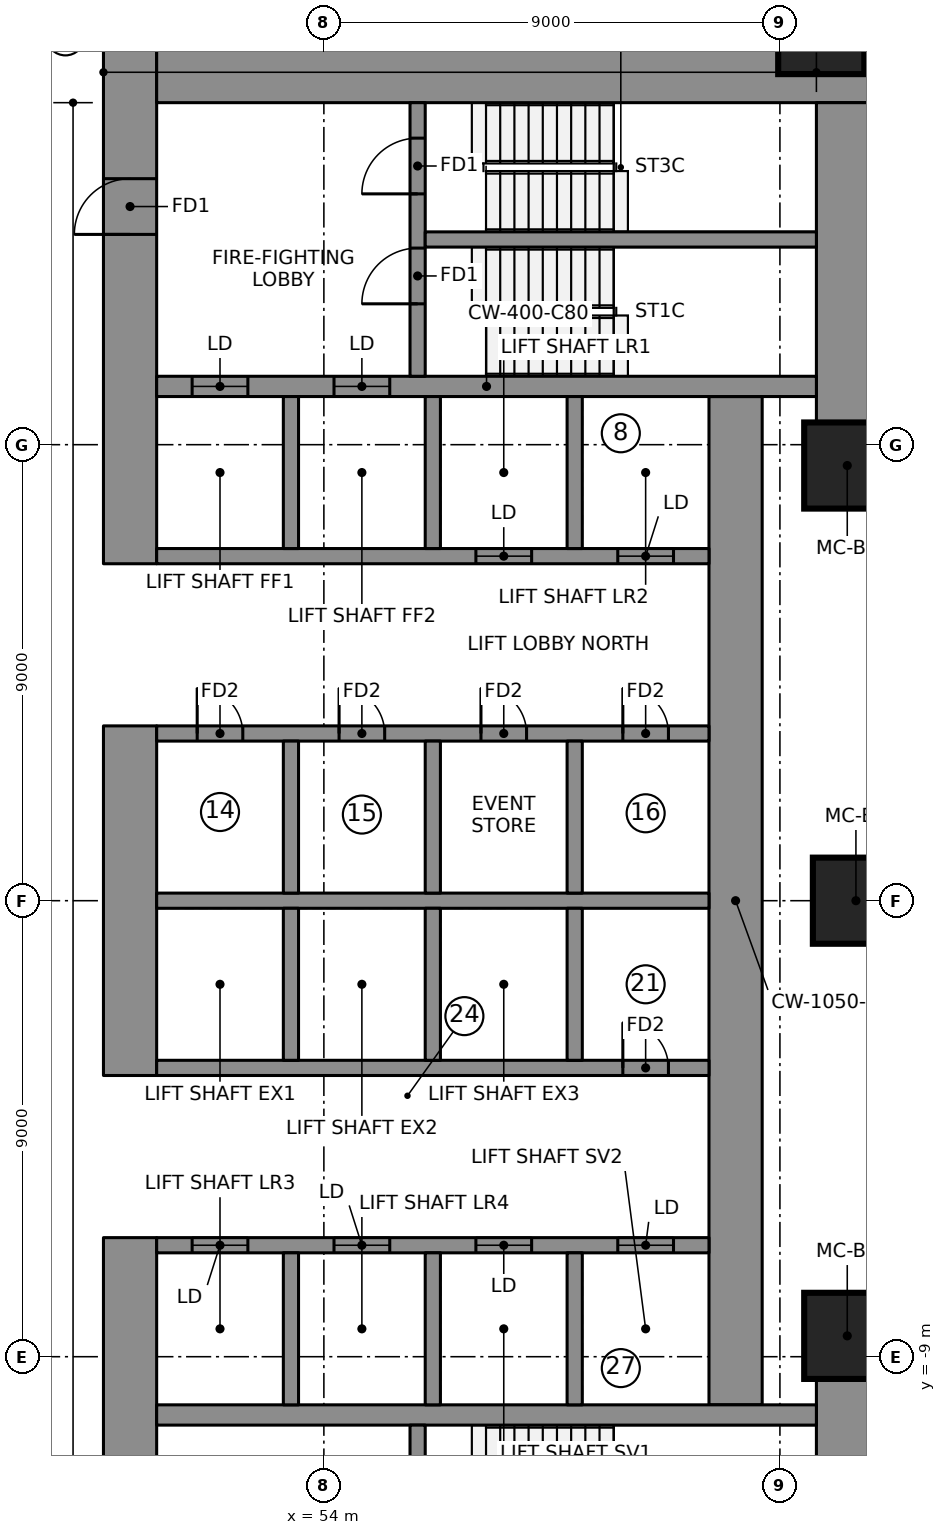
"""IFC4 building model, lengths in metres.
Left out: names, types, materials, properties, quantities, classifications, styles, units other than length and angle.
Written with IfcOpenShell. Run it as: python <this file> out.ifc"""

import sys

from ifc_helpers import new_model, si_unit, direction, frame, frame_2d, origin, origin_2d, place, context, subcontext, project, spatial, rectangle, extrude, element, fill, save


model = new_model("IFC4")
c1 = context("Model", 3, precision=1e-05, world=origin(), true_north=direction((0.0, 1.0)))
c2 = subcontext(c1, "Body", "Model", "MODEL_VIEW")
j1 = project(units=[si_unit("LENGTHUNIT", "METRE"), si_unit("PLANEANGLEUNIT", "RADIAN")], contexts=[c1])
p1 = place(None, origin())
s1 = spatial("IfcSite", under=j1, at=p1, CompositionType="ELEMENT")
p2 = place(p1, origin())
s2 = spatial("IfcBuilding", under=s1, at=p2, CompositionType="ELEMENT")
p3 = place(p2, frame((0.0, 0.0, 113.3)))
s3 = spatial("IfcBuildingStorey", under=s2, at=p3, CompositionType="ELEMENT", Elevation=113.3)
p4 = place(p3, frame((50.175, 6.65, 0.0), z_axis=(0.0, 0.0, 1.0), x_axis=(0.0, 1.0, 0.0)))
e1 = element("IfcWall", 1, at=p4, inside=s3, PredefinedType="SHEAR", context=c2, shape_type="SweptSolid", body=[
    extrude(rectangle(XDim=10.15, YDim=1.05, at=frame_2d((5.075, 0.0))), origin(), (0.0, 0.0, 1.0), 3.55),
])
p5 = place(p4, frame((6.5, 0.0, 0.0)))
e2 = element("IfcOpeningElement", 2, at=p5, cuts=e1, PredefinedType="OPENING", context=c2, shape_type="SweptSolid", body=[
    extrude(rectangle(XDim=1.1, YDim=2.1, at=frame_2d((0.55, 1.05))), frame((0.0, 0.535, 0.0), z_axis=(0.0, -1.0, 0.0), x_axis=(1.0, 0.0, 0.0)), (0.0, 0.0, 1.0), 1.07),
])
p6 = place(p3, frame((50.175, -3.45, 0.0), z_axis=(0.0, 0.0, 1.0), x_axis=(0.0, 1.0, 0.0)))
e3 = element("IfcWall", 3, at=p6, inside=s3, PredefinedType="SHEAR", context=c2, shape_type="SweptSolid", body=[
    extrude(rectangle(XDim=6.9, YDim=1.05, at=frame_2d((3.45, 0.0))), origin(), (0.0, 0.0, 1.0), 3.55),
])
p7 = place(p3, frame((50.175, -16.8, 0.0), z_axis=(0.0, 0.0, 1.0), x_axis=(0.0, 1.0, 0.0)))
e4 = element("IfcWall", 4, at=p7, inside=s3, PredefinedType="SHEAR", context=c2, shape_type="SweptSolid", body=[
    extrude(rectangle(XDim=10.15, YDim=1.05, at=frame_2d((5.075, 0.0))), origin(), (0.0, 0.0, 1.0), 3.55),
])
p8 = place(p7, frame((2.55, 0.0, 0.0)))
e5 = element("IfcOpeningElement", 5, at=p8, cuts=e4, PredefinedType="OPENING", context=c2, shape_type="SweptSolid", body=[
    extrude(rectangle(XDim=1.1, YDim=2.1, at=frame_2d((0.55, 1.05))), frame((0.0, 0.535, 0.0), z_axis=(0.0, -1.0, 0.0), x_axis=(1.0, 0.0, 0.0)), (0.0, 0.0, 1.0), 1.07),
])
p9 = place(p3, frame((50.7, 16.275, 0.0), z_axis=(0.0, 0.0, 1.0), x_axis=(1.0, 0.0, 0.0)))
e6 = element("IfcWall", 6, at=p9, inside=s3, PredefinedType="SHEAR", context=c2, shape_type="SweptSolid", body=[
    extrude(rectangle(XDim=14.07, YDim=1.05, at=frame_2d((7.035, 0.0))), origin(), (0.0, 0.0, 1.0), 3.55),
])
for number, where, z_axis, x_axis in (
    (7, (64.245, 9.389, 0.0), (0.0, 0.0, 1.0), (0.0, 1.0, 0.0)),
    (8, (64.245, -15.75, 0.0), (0.0, 0.0, 1.0), (0.0, 1.0, 0.0)),
):
    element("IfcWall", number, at=place(p3, frame(where, z_axis=z_axis, x_axis=x_axis)), inside=s3, PredefinedType="SHEAR", context=c2, shape_type="SweptSolid", body=[
        extrude(rectangle(XDim=6.361, YDim=1.05, at=frame_2d((3.181, 0.0))), origin(), (0.0, 0.0, 1.0), 3.55),
    ])
p10 = place(p3, frame((62.125, -9.95, 0.0), z_axis=(0.0, 0.0, 1.0), x_axis=(0.0, 1.0, 0.0)))
e9 = element("IfcWall", 9, at=p10, inside=s3, PredefinedType="SHEAR", context=c2, shape_type="SweptSolid", body=[
    extrude(rectangle(XDim=19.9, YDim=1.05, at=frame_2d((9.95, 0.0))), origin(), (0.0, 0.0, 1.0), 3.55),
])
p11 = place(p3, frame((50.7, 10.15, 0.0), z_axis=(0.0, 0.0, 1.0), x_axis=(1.0, 0.0, 0.0)))
e10 = element("IfcWall", 10, at=p11, inside=s3, PredefinedType="SHEAR", context=c2, shape_type="SweptSolid", body=[
    extrude(rectangle(XDim=13.02, YDim=0.4, at=frame_2d((6.51, 0.0))), origin(), (0.0, 0.0, 1.0), 3.55),
])
p12 = place(p11, frame((0.7, 0.0, 0.0)))
e11 = element("IfcOpeningElement", 11, at=p12, cuts=e10, PredefinedType="OPENING", context=c2, shape_type="SweptSolid", body=[
    extrude(rectangle(XDim=1.1, YDim=2.1, at=frame_2d((0.55, 1.05))), frame((0.0, 0.21, 0.0), z_axis=(0.0, -1.0, 0.0), x_axis=(1.0, 0.0, 0.0)), (0.0, 0.0, 1.0), 0.42),
])
p13 = place(p11, frame((3.5, 0.0, 0.0)))
e12 = element("IfcOpeningElement", 12, at=p13, cuts=e10, PredefinedType="OPENING", context=c2, shape_type="SweptSolid", body=[
    extrude(rectangle(XDim=1.1, YDim=2.1, at=frame_2d((0.55, 1.05))), frame((0.0, 0.21, 0.0), z_axis=(0.0, -1.0, 0.0), x_axis=(1.0, 0.0, 0.0)), (0.0, 0.0, 1.0), 0.42),
])
p14 = place(p3, frame((50.7, -10.15, 0.0), z_axis=(0.0, 0.0, 1.0), x_axis=(1.0, 0.0, 0.0)))
e13 = element("IfcWall", 13, at=p14, inside=s3, PredefinedType="SHEAR", context=c2, shape_type="SweptSolid", body=[
    extrude(rectangle(XDim=13.02, YDim=0.4, at=frame_2d((6.51, 0.0))), origin(), (0.0, 0.0, 1.0), 3.55),
])
p15 = place(p3, frame((50.7, 0.0, 0.0), z_axis=(0.0, 0.0, 1.0), x_axis=(1.0, 0.0, 0.0)))
e14 = element("IfcWall", 14, at=p15, inside=s3, PredefinedType="SHEAR", context=c2, shape_type="SweptSolid", body=[
    extrude(rectangle(XDim=10.9, YDim=0.3, at=frame_2d((5.45, 0.0))), origin(), (0.0, 0.0, 1.0), 3.55),
])
p16 = place(p3, frame((50.7, 3.3, 0.0), z_axis=(0.0, 0.0, 1.0), x_axis=(1.0, 0.0, 0.0)))
e15 = element("IfcWall", 15, at=p16, inside=s3, PredefinedType="SHEAR", context=c2, shape_type="SweptSolid", body=[
    extrude(rectangle(XDim=10.9, YDim=0.3, at=frame_2d((5.45, 0.0))), origin(), (0.0, 0.0, 1.0), 3.55),
])
p17 = place(p16, frame((0.8, 0.0, 0.0)))
e16 = element("IfcOpeningElement", 16, at=p17, cuts=e15, PredefinedType="OPENING", context=c2, shape_type="SweptSolid", body=[
    extrude(rectangle(XDim=0.9, YDim=2.1, at=frame_2d((0.45, 1.05))), frame((0.0, 0.16, 0.0), z_axis=(0.0, -1.0, 0.0), x_axis=(1.0, 0.0, 0.0)), (0.0, 0.0, 1.0), 0.32),
])
p18 = place(p16, frame((3.6, 0.0, 0.0)))
e17 = element("IfcOpeningElement", 17, at=p18, cuts=e15, PredefinedType="OPENING", context=c2, shape_type="SweptSolid", body=[
    extrude(rectangle(XDim=0.9, YDim=2.1, at=frame_2d((0.45, 1.05))), frame((0.0, 0.16, 0.0), z_axis=(0.0, -1.0, 0.0), x_axis=(1.0, 0.0, 0.0)), (0.0, 0.0, 1.0), 0.32),
])
p19 = place(p16, frame((6.4, 0.0, 0.0)))
e18 = element("IfcOpeningElement", 18, at=p19, cuts=e15, PredefinedType="OPENING", context=c2, shape_type="SweptSolid", body=[
    extrude(rectangle(XDim=0.9, YDim=2.1, at=frame_2d((0.45, 1.05))), frame((0.0, 0.16, 0.0), z_axis=(0.0, -1.0, 0.0), x_axis=(1.0, 0.0, 0.0)), (0.0, 0.0, 1.0), 0.32),
])
p20 = place(p16, frame((9.2, 0.0, 0.0)))
e19 = element("IfcOpeningElement", 19, at=p20, cuts=e15, PredefinedType="OPENING", context=c2, shape_type="SweptSolid", body=[
    extrude(rectangle(XDim=0.9, YDim=2.1, at=frame_2d((0.45, 1.05))), frame((0.0, 0.16, 0.0), z_axis=(0.0, -1.0, 0.0), x_axis=(1.0, 0.0, 0.0)), (0.0, 0.0, 1.0), 0.32),
])
p21 = place(p3, frame((50.7, 6.8, 0.0), z_axis=(0.0, 0.0, 1.0), x_axis=(1.0, 0.0, 0.0)))
e20 = element("IfcWall", 20, at=p21, inside=s3, PredefinedType="SHEAR", context=c2, shape_type="SweptSolid", body=[
    extrude(rectangle(XDim=10.9, YDim=0.3, at=frame_2d((5.45, 0.0))), origin(), (0.0, 0.0, 1.0), 3.55),
])
p22 = place(p21, frame((6.3, 0.0, 0.0)))
e21 = element("IfcOpeningElement", 21, at=p22, cuts=e20, PredefinedType="OPENING", context=c2, shape_type="SweptSolid", body=[
    extrude(rectangle(XDim=1.1, YDim=2.1, at=frame_2d((0.55, 1.05))), frame((0.0, 0.16, 0.0), z_axis=(0.0, -1.0, 0.0), x_axis=(1.0, 0.0, 0.0)), (0.0, 0.0, 1.0), 0.32),
])
p23 = place(p21, frame((9.1, 0.0, 0.0)))
e22 = element("IfcOpeningElement", 22, at=p23, cuts=e20, PredefinedType="OPENING", context=c2, shape_type="SweptSolid", body=[
    extrude(rectangle(XDim=1.1, YDim=2.1, at=frame_2d((0.55, 1.05))), frame((0.0, 0.16, 0.0), z_axis=(0.0, -1.0, 0.0), x_axis=(1.0, 0.0, 0.0)), (0.0, 0.0, 1.0), 0.32),
])
for number, where, z_axis, x_axis in (
    (23, (53.35, 0.15, 0.0), (0.0, 0.0, 1.0), (0.0, 1.0, 0.0)),
    (24, (53.35, 6.95, 0.0), (0.0, 0.0, 1.0), (0.0, 1.0, 0.0)),
    (25, (56.15, 0.15, 0.0), (0.0, 0.0, 1.0), (0.0, 1.0, 0.0)),
    (26, (56.15, 6.95, 0.0), (0.0, 0.0, 1.0), (0.0, 1.0, 0.0)),
    (27, (58.95, 0.15, 0.0), (0.0, 0.0, 1.0), (0.0, 1.0, 0.0)),
    (28, (58.95, 6.95, 0.0), (0.0, 0.0, 1.0), (0.0, 1.0, 0.0)),
):
    element("IfcWall", number, at=place(p3, frame(where, z_axis=z_axis, x_axis=x_axis)), inside=s3, PredefinedType="SHEAR", context=c2, shape_type="SweptSolid", body=[
        extrude(rectangle(XDim=3.0, YDim=0.3, at=frame_2d((1.5, 0.0))), origin(), (0.0, 0.0, 1.0), 3.55),
    ])
p24 = place(p3, frame((50.7, -3.3, 0.0), z_axis=(0.0, 0.0, 1.0), x_axis=(1.0, 0.0, 0.0)))
e29 = element("IfcWall", 29, at=p24, inside=s3, PredefinedType="SHEAR", context=c2, shape_type="SweptSolid", body=[
    extrude(rectangle(XDim=10.9, YDim=0.3, at=frame_2d((5.45, 0.0))), origin(), (0.0, 0.0, 1.0), 3.55),
])
p25 = place(p24, frame((9.2, 0.0, 0.0)))
e30 = element("IfcOpeningElement", 30, at=p25, cuts=e29, PredefinedType="OPENING", context=c2, shape_type="SweptSolid", body=[
    extrude(rectangle(XDim=0.9, YDim=2.1, at=frame_2d((0.45, 1.05))), frame((0.0, 0.16, 0.0), z_axis=(0.0, -1.0, 0.0), x_axis=(1.0, 0.0, 0.0)), (0.0, 0.0, 1.0), 0.32),
])
p26 = place(p3, frame((50.7, -6.8, 0.0), z_axis=(0.0, 0.0, 1.0), x_axis=(1.0, 0.0, 0.0)))
e31 = element("IfcWall", 31, at=p26, inside=s3, PredefinedType="SHEAR", context=c2, shape_type="SweptSolid", body=[
    extrude(rectangle(XDim=10.9, YDim=0.3, at=frame_2d((5.45, 0.0))), origin(), (0.0, 0.0, 1.0), 3.55),
])
p27 = place(p26, frame((0.7, 0.0, 0.0)))
e32 = element("IfcOpeningElement", 32, at=p27, cuts=e31, PredefinedType="OPENING", context=c2, shape_type="SweptSolid", body=[
    extrude(rectangle(XDim=1.1, YDim=2.1, at=frame_2d((0.55, 1.05))), frame((0.0, 0.16, 0.0), z_axis=(0.0, -1.0, 0.0), x_axis=(1.0, 0.0, 0.0)), (0.0, 0.0, 1.0), 0.32),
])
p28 = place(p26, frame((3.5, 0.0, 0.0)))
e33 = element("IfcOpeningElement", 33, at=p28, cuts=e31, PredefinedType="OPENING", context=c2, shape_type="SweptSolid", body=[
    extrude(rectangle(XDim=1.1, YDim=2.1, at=frame_2d((0.55, 1.05))), frame((0.0, 0.16, 0.0), z_axis=(0.0, -1.0, 0.0), x_axis=(1.0, 0.0, 0.0)), (0.0, 0.0, 1.0), 0.32),
])
p29 = place(p26, frame((6.3, 0.0, 0.0)))
e34 = element("IfcOpeningElement", 34, at=p29, cuts=e31, PredefinedType="OPENING", context=c2, shape_type="SweptSolid", body=[
    extrude(rectangle(XDim=1.1, YDim=2.1, at=frame_2d((0.55, 1.05))), frame((0.0, 0.16, 0.0), z_axis=(0.0, -1.0, 0.0), x_axis=(1.0, 0.0, 0.0)), (0.0, 0.0, 1.0), 0.32),
])
p30 = place(p26, frame((9.1, 0.0, 0.0)))
e35 = element("IfcOpeningElement", 35, at=p30, cuts=e31, PredefinedType="OPENING", context=c2, shape_type="SweptSolid", body=[
    extrude(rectangle(XDim=1.1, YDim=2.1, at=frame_2d((0.55, 1.05))), frame((0.0, 0.16, 0.0), z_axis=(0.0, -1.0, 0.0), x_axis=(1.0, 0.0, 0.0)), (0.0, 0.0, 1.0), 0.32),
])
for number, where, z_axis, x_axis in (
    (36, (53.35, -3.15, 0.0), (0.0, 0.0, 1.0), (0.0, 1.0, 0.0)),
    (37, (53.35, -9.95, 0.0), (0.0, 0.0, 1.0), (0.0, 1.0, 0.0)),
    (38, (56.15, -3.15, 0.0), (0.0, 0.0, 1.0), (0.0, 1.0, 0.0)),
    (39, (56.15, -9.95, 0.0), (0.0, 0.0, 1.0), (0.0, 1.0, 0.0)),
    (40, (58.95, -3.15, 0.0), (0.0, 0.0, 1.0), (0.0, 1.0, 0.0)),
    (41, (58.95, -9.95, 0.0), (0.0, 0.0, 1.0), (0.0, 1.0, 0.0)),
):
    element("IfcWall", number, at=place(p3, frame(where, z_axis=z_axis, x_axis=x_axis)), inside=s3, PredefinedType="SHEAR", context=c2, shape_type="SweptSolid", body=[
        extrude(rectangle(XDim=3.0, YDim=0.3, at=frame_2d((1.5, 0.0))), origin(), (0.0, 0.0, 1.0), 3.55),
    ])
p31 = place(p3, frame((55.85, 10.35, 0.0), z_axis=(0.0, 0.0, 1.0), x_axis=(0.0, 1.0, 0.0)))
e42 = element("IfcWall", 42, at=p31, inside=s3, PredefinedType="SHEAR", context=c2, shape_type="SweptSolid", body=[
    extrude(rectangle(XDim=5.4, YDim=0.3, at=frame_2d((2.7, 0.0))), origin(), (0.0, 0.0, 1.0), 3.55),
])
p32 = place(p31, frame((1.43, 0.0, 0.0)))
e43 = element("IfcOpeningElement", 43, at=p32, cuts=e42, PredefinedType="OPENING", context=c2, shape_type="SweptSolid", body=[
    extrude(rectangle(XDim=1.1, YDim=2.1, at=frame_2d((0.55, 1.05))), frame((0.0, 0.16, 0.0), z_axis=(0.0, -1.0, 0.0), x_axis=(1.0, 0.0, 0.0)), (0.0, 0.0, 1.0), 0.32),
])
p33 = place(p31, frame((3.6, 0.0, 0.0)))
e44 = element("IfcOpeningElement", 44, at=p33, cuts=e42, PredefinedType="OPENING", context=c2, shape_type="SweptSolid", body=[
    extrude(rectangle(XDim=1.1, YDim=2.1, at=frame_2d((0.55, 1.05))), frame((0.0, 0.16, 0.0), z_axis=(0.0, -1.0, 0.0), x_axis=(1.0, 0.0, 0.0)), (0.0, 0.0, 1.0), 0.32),
])
p34 = place(p3, frame((55.85, -15.75, 0.0), z_axis=(0.0, 0.0, 1.0), x_axis=(0.0, 1.0, 0.0)))
e45 = element("IfcWall", 45, at=p34, inside=s3, PredefinedType="SHEAR", context=c2, shape_type="SweptSolid", body=[
    extrude(rectangle(XDim=5.4, YDim=0.3, at=frame_2d((2.7, 0.0))), origin(), (0.0, 0.0, 1.0), 3.55),
])
p35 = place(p34, frame((3.6, 0.0, 0.0)))
e46 = element("IfcOpeningElement", 46, at=p35, cuts=e45, PredefinedType="OPENING", context=c2, shape_type="SweptSolid", body=[
    extrude(rectangle(XDim=1.1, YDim=2.1, at=frame_2d((0.55, 1.05))), frame((0.0, 0.16, 0.0), z_axis=(0.0, -1.0, 0.0), x_axis=(1.0, 0.0, 0.0)), (0.0, 0.0, 1.0), 0.32),
])
p36 = place(p34, frame((0.8, 0.0, 0.0)))
e47 = element("IfcOpeningElement", 47, at=p36, cuts=e45, PredefinedType="OPENING", context=c2, shape_type="SweptSolid", body=[
    extrude(rectangle(XDim=0.9, YDim=2.1, at=frame_2d((0.45, 1.05))), frame((0.0, 0.16, 0.0), z_axis=(0.0, -1.0, 0.0), x_axis=(1.0, 0.0, 0.0)), (0.0, 0.0, 1.0), 0.32),
])
p37 = place(p3, frame((56.0, 13.05, 0.0), z_axis=(0.0, 0.0, 1.0), x_axis=(1.0, 0.0, 0.0)))
e48 = element("IfcWall", 48, at=p37, inside=s3, PredefinedType="SHEAR", context=c2, shape_type="SweptSolid", body=[
    extrude(rectangle(XDim=7.72, YDim=0.3, at=frame_2d((3.86, 0.0))), origin(), (0.0, 0.0, 1.0), 3.55),
])
for number, where, z_axis, x_axis in (
    (49, (64.329, -8.589, 0.0), (0.0, 0.0, 1.0), (1.0, 0.0, 0.0)),
    (50, (64.5, 0.0, 0.0), (0.0, 0.0, 1.0), (1.0, 0.0, 0.0)),
    (51, (64.329, 8.589, 0.0), (0.0, 0.0, 1.0), (1.0, 0.0, 0.0)),
    (52, (63.816, 17.164, 0.0), (0.0, 0.0, 1.0), (1.0, 0.0, 0.0)),
):
    element("IfcColumn", number, at=place(p3, frame(where, z_axis=z_axis, x_axis=x_axis)), inside=s3, PredefinedType="COLUMN", context=c2, shape_type="SweptSolid", body=[
        extrude(rectangle(XDim=1.7, YDim=1.7, at=origin_2d()), origin(), (0.0, 0.0, 1.0), 3.55),
    ])
p38 = place(p12, origin())
e53 = element("IfcDoor", 53, at=p38, inside=s3, OperationType="DOUBLE_DOOR_SLIDING", PredefinedType="DOOR", context=c2, shape_type="SweptSolid", body=[
    extrude(rectangle(XDim=1.1, YDim=2.1, at=frame_2d((0.55, 1.05))), frame((0.0, 0.025, 0.0), z_axis=(0.0, -1.0, 0.0), x_axis=(1.0, 0.0, 0.0)), (0.0, 0.0, 1.0), 0.05),
])
fill(e11, e53)
p39 = place(p13, origin())
e54 = element("IfcDoor", 54, at=p39, inside=s3, OperationType="DOUBLE_DOOR_SLIDING", PredefinedType="DOOR", context=c2, shape_type="SweptSolid", body=[
    extrude(rectangle(XDim=1.1, YDim=2.1, at=frame_2d((0.55, 1.05))), frame((0.0, 0.025, 0.0), z_axis=(0.0, -1.0, 0.0), x_axis=(1.0, 0.0, 0.0)), (0.0, 0.0, 1.0), 0.05),
])
fill(e12, e54)
p40 = place(p22, origin())
e55 = element("IfcDoor", 55, at=p40, inside=s3, OperationType="DOUBLE_DOOR_SLIDING", PredefinedType="DOOR", context=c2, shape_type="SweptSolid", body=[
    extrude(rectangle(XDim=1.1, YDim=2.1, at=frame_2d((0.55, 1.05))), frame((0.0, 0.025, 0.0), z_axis=(0.0, -1.0, 0.0), x_axis=(1.0, 0.0, 0.0)), (0.0, 0.0, 1.0), 0.05),
])
fill(e21, e55)
p41 = place(p23, origin())
e56 = element("IfcDoor", 56, at=p41, inside=s3, OperationType="DOUBLE_DOOR_SLIDING", PredefinedType="DOOR", context=c2, shape_type="SweptSolid", body=[
    extrude(rectangle(XDim=1.1, YDim=2.1, at=frame_2d((0.55, 1.05))), frame((0.0, 0.025, 0.0), z_axis=(0.0, -1.0, 0.0), x_axis=(1.0, 0.0, 0.0)), (0.0, 0.0, 1.0), 0.05),
])
fill(e22, e56)
p42 = place(p27, origin())
e57 = element("IfcDoor", 57, at=p42, inside=s3, OperationType="DOUBLE_DOOR_SLIDING", PredefinedType="DOOR", context=c2, shape_type="SweptSolid", body=[
    extrude(rectangle(XDim=1.1, YDim=2.1, at=frame_2d((0.55, 1.05))), frame((0.0, 0.025, 0.0), z_axis=(0.0, -1.0, 0.0), x_axis=(1.0, 0.0, 0.0)), (0.0, 0.0, 1.0), 0.05),
])
fill(e32, e57)
p43 = place(p28, origin())
e58 = element("IfcDoor", 58, at=p43, inside=s3, OperationType="DOUBLE_DOOR_SLIDING", PredefinedType="DOOR", context=c2, shape_type="SweptSolid", body=[
    extrude(rectangle(XDim=1.1, YDim=2.1, at=frame_2d((0.55, 1.05))), frame((0.0, 0.025, 0.0), z_axis=(0.0, -1.0, 0.0), x_axis=(1.0, 0.0, 0.0)), (0.0, 0.0, 1.0), 0.05),
])
fill(e33, e58)
p44 = place(p29, origin())
e59 = element("IfcDoor", 59, at=p44, inside=s3, OperationType="DOUBLE_DOOR_SLIDING", PredefinedType="DOOR", context=c2, shape_type="SweptSolid", body=[
    extrude(rectangle(XDim=1.1, YDim=2.1, at=frame_2d((0.55, 1.05))), frame((0.0, 0.025, 0.0), z_axis=(0.0, -1.0, 0.0), x_axis=(1.0, 0.0, 0.0)), (0.0, 0.0, 1.0), 0.05),
])
fill(e34, e59)
p45 = place(p30, origin())
e60 = element("IfcDoor", 60, at=p45, inside=s3, OperationType="DOUBLE_DOOR_SLIDING", PredefinedType="DOOR", context=c2, shape_type="SweptSolid", body=[
    extrude(rectangle(XDim=1.1, YDim=2.1, at=frame_2d((0.55, 1.05))), frame((0.0, 0.025, 0.0), z_axis=(0.0, -1.0, 0.0), x_axis=(1.0, 0.0, 0.0)), (0.0, 0.0, 1.0), 0.05),
])
fill(e35, e60)
p46 = place(p32, origin())
e61 = element("IfcDoor", 61, at=p46, inside=s3, OperationType="SINGLE_SWING_RIGHT", PredefinedType="DOOR", context=c2, shape_type="SweptSolid", body=[
    extrude(rectangle(XDim=1.1, YDim=2.1, at=frame_2d((0.55, 1.05))), frame((0.0, 0.025, 0.0), z_axis=(0.0, -1.0, 0.0), x_axis=(1.0, 0.0, 0.0)), (0.0, 0.0, 1.0), 0.05),
])
fill(e43, e61)
p47 = place(p33, origin())
e62 = element("IfcDoor", 62, at=p47, inside=s3, OperationType="SINGLE_SWING_RIGHT", PredefinedType="DOOR", context=c2, shape_type="SweptSolid", body=[
    extrude(rectangle(XDim=1.1, YDim=2.1, at=frame_2d((0.55, 1.05))), frame((0.0, 0.025, 0.0), z_axis=(0.0, -1.0, 0.0), x_axis=(1.0, 0.0, 0.0)), (0.0, 0.0, 1.0), 0.05),
])
fill(e44, e62)
p48 = place(p5, origin())
e63 = element("IfcDoor", 63, at=p48, inside=s3, OperationType="SINGLE_SWING_RIGHT", PredefinedType="DOOR", context=c2, shape_type="SweptSolid", body=[
    extrude(rectangle(XDim=1.1, YDim=2.1, at=frame_2d((0.55, 1.05))), frame((0.0, 0.025, 0.0), z_axis=(0.0, -1.0, 0.0), x_axis=(1.0, 0.0, 0.0)), (0.0, 0.0, 1.0), 0.05),
])
fill(e2, e63)
p49 = place(p17, origin())
e64 = element("IfcDoor", 64, at=p49, inside=s3, OperationType="SINGLE_SWING_LEFT", PredefinedType="DOOR", context=c2, shape_type="SweptSolid", body=[
    extrude(rectangle(XDim=0.9, YDim=2.1, at=frame_2d((0.45, 1.05))), frame((0.0, 0.025, 0.0), z_axis=(0.0, -1.0, 0.0), x_axis=(1.0, 0.0, 0.0)), (0.0, 0.0, 1.0), 0.05),
])
fill(e16, e64)
p50 = place(p18, origin())
e65 = element("IfcDoor", 65, at=p50, inside=s3, OperationType="SINGLE_SWING_LEFT", PredefinedType="DOOR", context=c2, shape_type="SweptSolid", body=[
    extrude(rectangle(XDim=0.9, YDim=2.1, at=frame_2d((0.45, 1.05))), frame((0.0, 0.025, 0.0), z_axis=(0.0, -1.0, 0.0), x_axis=(1.0, 0.0, 0.0)), (0.0, 0.0, 1.0), 0.05),
])
fill(e17, e65)
p51 = place(p19, origin())
e66 = element("IfcDoor", 66, at=p51, inside=s3, OperationType="SINGLE_SWING_LEFT", PredefinedType="DOOR", context=c2, shape_type="SweptSolid", body=[
    extrude(rectangle(XDim=0.9, YDim=2.1, at=frame_2d((0.45, 1.05))), frame((0.0, 0.025, 0.0), z_axis=(0.0, -1.0, 0.0), x_axis=(1.0, 0.0, 0.0)), (0.0, 0.0, 1.0), 0.05),
])
fill(e18, e66)
p52 = place(p20, origin())
e67 = element("IfcDoor", 67, at=p52, inside=s3, OperationType="SINGLE_SWING_LEFT", PredefinedType="DOOR", context=c2, shape_type="SweptSolid", body=[
    extrude(rectangle(XDim=0.9, YDim=2.1, at=frame_2d((0.45, 1.05))), frame((0.0, 0.025, 0.0), z_axis=(0.0, -1.0, 0.0), x_axis=(1.0, 0.0, 0.0)), (0.0, 0.0, 1.0), 0.05),
])
fill(e19, e67)
p53 = place(p25, origin())
e68 = element("IfcDoor", 68, at=p53, inside=s3, OperationType="SINGLE_SWING_LEFT", PredefinedType="DOOR", context=c2, shape_type="SweptSolid", body=[
    extrude(rectangle(XDim=0.9, YDim=2.1, at=frame_2d((0.45, 1.05))), frame((0.0, 0.025, 0.0), z_axis=(0.0, -1.0, 0.0), x_axis=(1.0, 0.0, 0.0)), (0.0, 0.0, 1.0), 0.05),
])
fill(e30, e68)
save(model, sys.argv[1])
